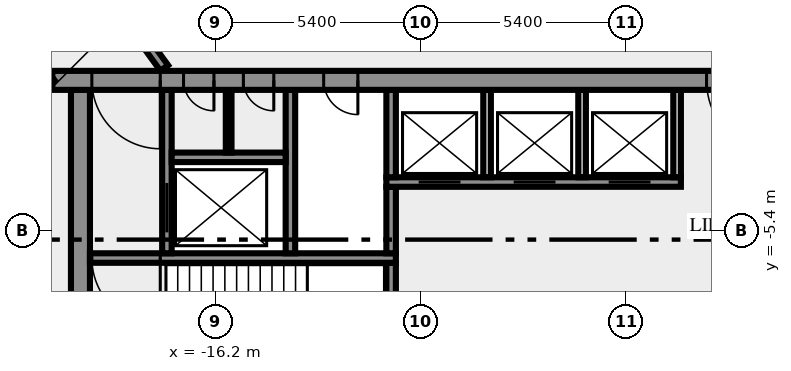
"""IFC4 building model, lengths in metres.
Left out: names, types, materials, properties, quantities, classifications, styles, units other than length and angle.
Written with IfcOpenShell. Run it as: python <this file> out.ifc"""

import sys

from ifc_helpers import new_model, si_unit, direction, frame, frame_2d, origin, place, context, subcontext, project, spatial, rectangle, extrude, element, fill, save


model = new_model("IFC4")
c1 = context("Model", 3, precision=1e-05, world=origin(), true_north=direction((0.0, 1.0)))
c2 = subcontext(c1, "Body", "Model", "MODEL_VIEW")
j1 = project(units=[si_unit("LENGTHUNIT", "METRE"), si_unit("PLANEANGLEUNIT", "RADIAN")], contexts=[c1])
p1 = place(None, origin())
s1 = spatial("IfcSite", under=j1, at=p1, CompositionType="ELEMENT")
p2 = place(p1, origin())
s2 = spatial("IfcBuilding", under=s1, at=p2, CompositionType="ELEMENT")
p3 = place(p2, frame((0.0, 0.0, 11.5)))
s3 = spatial("IfcBuildingStorey", under=s2, at=p3, CompositionType="ELEMENT", Elevation=11.5)
p4 = place(p3, frame((-19.75, -10.5, 0.0), z_axis=(0.0, 0.0, 1.0), x_axis=(0.0, 1.0, 0.0)))
e1 = element("IfcWall", 1, at=p4, inside=s3, PredefinedType="SHEAR", context=c2, shape_type="SweptSolid", body=[
    extrude(rectangle(XDim=8.8, YDim=0.5, at=frame_2d((4.4, 0.0))), origin(), (0.0, 0.0, 1.0), 4.1),
])
p5 = place(p3, frame((-11.575, -7.25, 0.0), z_axis=(0.0, 0.0, 1.0), x_axis=(0.0, 1.0, 0.0)))
e2 = element("IfcWall", 2, at=p5, inside=s3, PredefinedType="SHEAR", context=c2, shape_type="SweptSolid", body=[
    extrude(rectangle(XDim=1.0, YDim=0.25, at=frame_2d((0.5, 0.0))), origin(), (0.0, 0.0, 1.0), 4.1),
])
p6 = place(p3, frame((-11.45, -6.125, 0.0), z_axis=(0.0, 0.0, 1.0), x_axis=(-1.0, 0.0, 0.0)))
e3 = element("IfcWall", 3, at=p6, inside=s3, PredefinedType="SHEAR", context=c2, shape_type="SweptSolid", body=[
    extrude(rectangle(XDim=8.05, YDim=0.25, at=frame_2d((4.025, 0.0))), origin(), (0.0, 0.0, 1.0), 4.1),
])
p7 = place(p6, frame((6.2, 0.0, 0.0)))
e4 = element("IfcOpeningElement", 4, at=p7, cuts=e3, PredefinedType="OPENING", context=c2, shape_type="SweptSolid", body=[
    extrude(rectangle(XDim=1.8, YDim=2.1, at=frame_2d((0.9, 1.05))), frame((0.0, 0.135, 0.0), z_axis=(0.0, -1.0, 0.0), x_axis=(1.0, 0.0, 0.0)), (0.0, 0.0, 1.0), 0.27),
])
p8 = place(p3, frame((-17.475, -6.0, 0.0), z_axis=(0.0, 0.0, 1.0), x_axis=(0.0, 1.0, 0.0)))
e5 = element("IfcWall", 5, at=p8, inside=s3, PredefinedType="SHEAR", context=c2, shape_type="SweptSolid", body=[
    extrude(rectangle(XDim=4.3, YDim=0.25, at=frame_2d((2.15, 0.0))), origin(), (0.0, 0.0, 1.0), 4.1),
])
p9 = place(p8, frame((0.55, 0.0, 0.0)))
e6 = element("IfcOpeningElement", 6, at=p9, cuts=e5, PredefinedType="OPENING", context=c2, shape_type="SweptSolid", body=[
    extrude(rectangle(XDim=1.3, YDim=2.1, at=frame_2d((0.65, 1.05))), frame((0.0, 0.135, 0.0), z_axis=(0.0, -1.0, 0.0), x_axis=(1.0, 0.0, 0.0)), (0.0, 0.0, 1.0), 0.27),
])
p10 = place(p3, frame((-14.225, -6.0, 0.0), z_axis=(0.0, 0.0, 1.0), x_axis=(0.0, 1.0, 0.0)))
e7 = element("IfcWall", 7, at=p10, inside=s3, PredefinedType="SHEAR", context=c2, shape_type="SweptSolid", body=[
    extrude(rectangle(XDim=4.3, YDim=0.25, at=frame_2d((2.15, 0.0))), origin(), (0.0, 0.0, 1.0), 4.1),
])
p11 = place(p3, frame((-11.575, -6.0, 0.0), z_axis=(0.0, 0.0, 1.0), x_axis=(0.0, 1.0, 0.0)))
e8 = element("IfcWall", 8, at=p11, inside=s3, PredefinedType="SHEAR", context=c2, shape_type="SweptSolid", body=[
    extrude(rectangle(XDim=1.75, YDim=0.25, at=frame_2d((0.875, 0.0))), origin(), (0.0, 0.0, 1.0), 4.1),
])
p12 = place(p3, frame((-11.7, -4.125, 0.0), z_axis=(0.0, 0.0, 1.0), x_axis=(1.0, 0.0, 0.0)))
e9 = element("IfcWall", 9, at=p12, inside=s3, PredefinedType="SHEAR", context=c2, shape_type="SweptSolid", body=[
    extrude(rectangle(XDim=7.75, YDim=0.25, at=frame_2d((3.875, 0.0))), origin(), (0.0, 0.0, 1.0), 4.1),
])
p13 = place(p12, frame((0.85, 0.0, 0.0)))
e10 = element("IfcOpeningElement", 10, at=p13, cuts=e9, PredefinedType="OPENING", context=c2, shape_type="SweptSolid", body=[
    extrude(rectangle(XDim=1.1, YDim=2.1, at=frame_2d((0.55, 1.05))), frame((0.0, 0.135, 0.0), z_axis=(0.0, -1.0, 0.0), x_axis=(1.0, 0.0, 0.0)), (0.0, 0.0, 1.0), 0.27),
])
p14 = place(p12, frame((3.35, 0.0, 0.0)))
e11 = element("IfcOpeningElement", 11, at=p14, cuts=e9, PredefinedType="OPENING", context=c2, shape_type="SweptSolid", body=[
    extrude(rectangle(XDim=1.1, YDim=2.1, at=frame_2d((0.55, 1.05))), frame((0.0, 0.135, 0.0), z_axis=(0.0, -1.0, 0.0), x_axis=(1.0, 0.0, 0.0)), (0.0, 0.0, 1.0), 0.27),
])
p15 = place(p12, frame((5.85, 0.0, 0.0)))
e12 = element("IfcOpeningElement", 12, at=p15, cuts=e9, PredefinedType="OPENING", context=c2, shape_type="SweptSolid", body=[
    extrude(rectangle(XDim=1.1, YDim=2.1, at=frame_2d((0.55, 1.05))), frame((0.0, 0.135, 0.0), z_axis=(0.0, -1.0, 0.0), x_axis=(1.0, 0.0, 0.0)), (0.0, 0.0, 1.0), 0.27),
])
p16 = place(p3, frame((-11.575, -4.0, 0.0), z_axis=(0.0, 0.0, 1.0), x_axis=(0.0, 1.0, 0.0)))
e13 = element("IfcWall", 13, at=p16, inside=s3, PredefinedType="SHEAR", context=c2, shape_type="SweptSolid", body=[
    extrude(rectangle(XDim=2.3, YDim=0.25, at=frame_2d((1.15, 0.0))), origin(), (0.0, 0.0, 1.0), 4.1),
])
for number, where, z_axis, x_axis in (
    (14, (-9.05, -4.0, 0.0), (0.0, 0.0, 1.0), (0.0, 1.0, 0.0)),
    (15, (-6.55, -4.0, 0.0), (0.0, 0.0, 1.0), (0.0, 1.0, 0.0)),
    (16, (-4.05, -4.0, 0.0), (0.0, 0.0, 1.0), (0.0, 1.0, 0.0)),
):
    element("IfcWall", number, at=place(p3, frame(where, z_axis=z_axis, x_axis=x_axis)), inside=s3, PredefinedType="SOLIDWALL", context=c2, shape_type="SweptSolid", body=[
        extrude(rectangle(XDim=2.3, YDim=0.2, at=frame_2d((1.15, 0.0))), origin(), (0.0, 0.0, 1.0), 4.1),
    ])
p17 = place(p3, frame((-17.35, -3.475, 0.0), z_axis=(0.0, 0.0, 1.0), x_axis=(1.0, 0.0, 0.0)))
e17 = element("IfcWall", 17, at=p17, inside=s3, PredefinedType="SHEAR", context=c2, shape_type="SweptSolid", body=[
    extrude(rectangle(XDim=3.0, YDim=0.25, at=frame_2d((1.5, 0.0))), origin(), (0.0, 0.0, 1.0), 4.1),
])
p18 = place(p3, frame((-15.85, -3.35, 0.0), z_axis=(0.0, 0.0, 1.0), x_axis=(0.0, 1.0, 0.0)))
e18 = element("IfcWall", 18, at=p18, inside=s3, PredefinedType="PARTITIONING", context=c2, shape_type="SweptSolid", body=[
    extrude(rectangle(XDim=1.65, YDim=0.15, at=frame_2d((0.825, 0.0))), origin(), (0.0, 0.0, 1.0), 4.1),
])
p19 = place(p3, frame((20.49, -1.45, 0.0), z_axis=(0.0, 0.0, 1.0), x_axis=(-1.0, 0.0, 0.0)))
e19 = element("IfcWall", 19, at=p19, inside=s3, PredefinedType="SHEAR", context=c2, shape_type="SweptSolid", body=[
    extrude(rectangle(XDim=40.98, YDim=0.5, at=frame_2d((20.49, 0.0))), origin(), (0.0, 0.0, 1.0), 4.1),
])
p20 = place(p19, frame((38.14, 0.0, 0.0)))
e20 = element("IfcOpeningElement", 20, at=p20, cuts=e19, PredefinedType="OPENING", context=c2, shape_type="SweptSolid", body=[
    extrude(rectangle(XDim=1.8, YDim=2.1, at=frame_2d((0.9, 1.05))), frame((0.0, 0.26, 0.0), z_axis=(0.0, -1.0, 0.0), x_axis=(1.0, 0.0, 0.0)), (0.0, 0.0, 1.0), 0.52),
])
p21 = place(p19, frame((36.728, 0.0, 0.0)))
e21 = element("IfcOpeningElement", 21, at=p21, cuts=e19, PredefinedType="OPENING", context=c2, shape_type="SweptSolid", body=[
    extrude(rectangle(XDim=0.8, YDim=2.1, at=frame_2d((0.4, 1.05))), frame((0.0, 0.26, 0.0), z_axis=(0.0, -1.0, 0.0), x_axis=(1.0, 0.0, 0.0)), (0.0, 0.0, 1.0), 0.52),
])
p22 = place(p19, frame((35.153, 0.0, 0.0)))
e22 = element("IfcOpeningElement", 22, at=p22, cuts=e19, PredefinedType="OPENING", context=c2, shape_type="SweptSolid", body=[
    extrude(rectangle(XDim=0.8, YDim=2.1, at=frame_2d((0.4, 1.05))), frame((0.0, 0.26, 0.0), z_axis=(0.0, -1.0, 0.0), x_axis=(1.0, 0.0, 0.0)), (0.0, 0.0, 1.0), 0.52),
])
p23 = place(p19, frame((32.94, 0.0, 0.0)))
e23 = element("IfcOpeningElement", 23, at=p23, cuts=e19, PredefinedType="OPENING", context=c2, shape_type="SweptSolid", body=[
    extrude(rectangle(XDim=0.9, YDim=2.1, at=frame_2d((0.45, 1.05))), frame((0.0, 0.26, 0.0), z_axis=(0.0, -1.0, 0.0), x_axis=(1.0, 0.0, 0.0)), (0.0, 0.0, 1.0), 0.52),
])
p24 = place(p19, frame((21.765, 0.0, 0.0)))
e24 = element("IfcOpeningElement", 24, at=p24, cuts=e19, PredefinedType="OPENING", context=c2, shape_type="SweptSolid", body=[
    extrude(rectangle(XDim=2.0, YDim=2.1, at=frame_2d((1.0, 1.05))), frame((0.0, 0.26, 0.0), z_axis=(0.0, -1.0, 0.0), x_axis=(1.0, 0.0, 0.0)), (0.0, 0.0, 1.0), 0.52),
])
p25 = place(p19, frame((7.14, 0.0, 0.0)))
e25 = element("IfcOpeningElement", 25, at=p25, cuts=e19, PredefinedType="OPENING", context=c2, shape_type="SweptSolid", body=[
    extrude(rectangle(XDim=0.9, YDim=2.1, at=frame_2d((0.45, 1.05))), frame((0.0, 0.26, 0.0), z_axis=(0.0, -1.0, 0.0), x_axis=(1.0, 0.0, 0.0)), (0.0, 0.0, 1.0), 0.52),
])
p26 = place(p19, frame((4.19, 0.0, 0.0)))
e26 = element("IfcOpeningElement", 26, at=p26, cuts=e19, PredefinedType="OPENING", context=c2, shape_type="SweptSolid", body=[
    extrude(rectangle(XDim=0.9, YDim=2.1, at=frame_2d((0.45, 1.05))), frame((0.0, 0.26, 0.0), z_axis=(0.0, -1.0, 0.0), x_axis=(1.0, 0.0, 0.0)), (0.0, 0.0, 1.0), 0.52),
])
p27 = place(p19, frame((1.04, 0.0, 0.0)))
e27 = element("IfcOpeningElement", 27, at=p27, cuts=e19, PredefinedType="OPENING", context=c2, shape_type="SweptSolid", body=[
    extrude(rectangle(XDim=1.8, YDim=2.1, at=frame_2d((0.9, 1.05))), frame((0.0, 0.26, 0.0), z_axis=(0.0, -1.0, 0.0), x_axis=(1.0, 0.0, 0.0)), (0.0, 0.0, 1.0), 0.52),
])
p28 = place(p3, frame((-20.531, -1.523, 0.0), z_axis=(0.0, 0.0, 1.0), x_axis=(-0.587784522481, 0.809017524614, 0.0)))
e28 = element("IfcWall", 28, at=p28, inside=s3, PredefinedType="SOLIDWALL", context=c2, shape_type="SweptSolid", body=[
    extrude(rectangle(XDim=49.912, YDim=0.25, at=frame_2d((24.956, 0.0))), origin(), (0.0, 0.0, 1.0), 4.1),
])
p29 = place(p28, frame((48.57, 0.0, 0.0)))
e29 = element("IfcOpeningElement", 29, at=p29, cuts=e28, PredefinedType="OPENING", context=c2, shape_type="SweptSolid", body=[
    extrude(rectangle(XDim=0.9, YDim=2.1, at=frame_2d((0.45, 1.05))), frame((0.0, 0.135, 0.0), z_axis=(0.0, -1.0, 0.0), x_axis=(1.0, 0.0, 0.0)), (0.0, 0.0, 1.0), 0.27),
])
p30 = place(p28, frame((9.165, 0.0, 0.0)))
e30 = element("IfcOpeningElement", 30, at=p30, cuts=e28, PredefinedType="OPENING", context=c2, shape_type="SweptSolid", body=[
    extrude(rectangle(XDim=0.9, YDim=2.1, at=frame_2d((0.45, 1.05))), frame((0.0, 0.135, 0.0), z_axis=(0.0, -1.0, 0.0), x_axis=(1.0, 0.0, 0.0)), (0.0, 0.0, 1.0), 0.27),
])
p31 = place(p28, frame((21.416, 0.0, 0.0)))
e31 = element("IfcOpeningElement", 31, at=p31, cuts=e28, PredefinedType="OPENING", context=c2, shape_type="SweptSolid", body=[
    extrude(rectangle(XDim=1.8, YDim=2.1, at=frame_2d((0.9, 1.05))), frame((0.0, 0.135, 0.0), z_axis=(0.0, -1.0, 0.0), x_axis=(1.0, 0.0, 0.0)), (0.0, 0.0, 1.0), 0.27),
])
p32 = place(p28, frame((28.066, 0.0, 0.0)))
e32 = element("IfcOpeningElement", 32, at=p32, cuts=e28, PredefinedType="OPENING", context=c2, shape_type="SweptSolid", body=[
    extrude(rectangle(XDim=0.9, YDim=2.1, at=frame_2d((0.45, 1.05))), frame((0.0, 0.135, 0.0), z_axis=(0.0, -1.0, 0.0), x_axis=(1.0, 0.0, 0.0)), (0.0, 0.0, 1.0), 0.27),
])
p33 = place(p28, frame((0.533, 0.0, 0.0)))
e33 = element("IfcOpeningElement", 33, at=p33, cuts=e28, PredefinedType="OPENING", context=c2, shape_type="SweptSolid", body=[
    extrude(rectangle(XDim=0.9, YDim=2.1, at=frame_2d((0.45, 1.05))), frame((0.0, 0.135, 0.0), z_axis=(0.0, -1.0, 0.0), x_axis=(1.0, 0.0, 0.0)), (0.0, 0.0, 1.0), 0.27),
])
p34 = place(p3, frame((-37.232, 25.972, 0.0), z_axis=(0.0, 0.0, 1.0), x_axis=(0.587786323093, -0.809016216391, 0.0)))
e34 = element("IfcWall", 34, at=p34, inside=s3, PredefinedType="SOLIDWALL", context=c2, shape_type="SweptSolid", body=[
    extrude(rectangle(XDim=33.493, YDim=0.25, at=frame_2d((16.747, 0.0))), origin(), (0.0, 0.0, 1.0), 4.1),
])
p35 = place(p34, frame((4.438, 0.0, 0.0)))
e35 = element("IfcOpeningElement", 35, at=p35, cuts=e34, PredefinedType="OPENING", context=c2, shape_type="SweptSolid", body=[
    extrude(rectangle(XDim=1.8, YDim=2.1, at=frame_2d((0.9, 1.05))), frame((0.0, 0.135, 0.0), z_axis=(0.0, -1.0, 0.0), x_axis=(1.0, 0.0, 0.0)), (0.0, 0.0, 1.0), 0.27),
])
p36 = place(p34, frame((29.152, 0.0, 0.0)))
e36 = element("IfcOpeningElement", 36, at=p36, cuts=e34, PredefinedType="OPENING", context=c2, shape_type="SweptSolid", body=[
    extrude(rectangle(XDim=0.9, YDim=2.1, at=frame_2d((0.45, 1.05))), frame((0.0, 0.135, 0.0), z_axis=(0.0, -1.0, 0.0), x_axis=(1.0, 0.0, 0.0)), (0.0, 0.0, 1.0), 0.27),
])
p37 = place(p34, frame((14.835, 0.0, 0.0)))
e37 = element("IfcOpeningElement", 37, at=p37, cuts=e34, PredefinedType="OPENING", context=c2, shape_type="SweptSolid", body=[
    extrude(rectangle(XDim=0.9, YDim=2.1, at=frame_2d((0.45, 1.05))), frame((0.0, 0.135, 0.0), z_axis=(0.0, -1.0, 0.0), x_axis=(1.0, 0.0, 0.0)), (0.0, 0.0, 1.0), 0.27),
])
p38 = place(p7, origin())
e38 = element("IfcDoor", 38, at=p38, inside=s3, OperationType="DOUBLE_DOOR_SINGLE_SWING", PredefinedType="DOOR", context=c2, shape_type="SweptSolid", body=[
    extrude(rectangle(XDim=1.8, YDim=2.1, at=frame_2d((0.9, 1.05))), frame((0.0, 0.025, 0.0), z_axis=(0.0, -1.0, 0.0), x_axis=(1.0, 0.0, 0.0)), (0.0, 0.0, 1.0), 0.05),
])
fill(e4, e38)
p39 = place(p9, origin())
e39 = element("IfcDoor", 39, at=p39, inside=s3, OperationType="DOUBLE_DOOR_SLIDING", PredefinedType="DOOR", context=c2, shape_type="SweptSolid", body=[
    extrude(rectangle(XDim=1.3, YDim=2.1, at=frame_2d((0.65, 1.05))), frame((0.0, 0.025, 0.0), z_axis=(0.0, -1.0, 0.0), x_axis=(1.0, 0.0, 0.0)), (0.0, 0.0, 1.0), 0.05),
])
fill(e6, e39)
p40 = place(p13, origin())
e40 = element("IfcDoor", 40, at=p40, inside=s3, OperationType="DOUBLE_DOOR_SLIDING", PredefinedType="DOOR", context=c2, shape_type="SweptSolid", body=[
    extrude(rectangle(XDim=1.1, YDim=2.1, at=frame_2d((0.55, 1.05))), frame((0.0, 0.025, 0.0), z_axis=(0.0, -1.0, 0.0), x_axis=(1.0, 0.0, 0.0)), (0.0, 0.0, 1.0), 0.05),
])
fill(e10, e40)
p41 = place(p14, origin())
e41 = element("IfcDoor", 41, at=p41, inside=s3, OperationType="DOUBLE_DOOR_SLIDING", PredefinedType="DOOR", context=c2, shape_type="SweptSolid", body=[
    extrude(rectangle(XDim=1.1, YDim=2.1, at=frame_2d((0.55, 1.05))), frame((0.0, 0.025, 0.0), z_axis=(0.0, -1.0, 0.0), x_axis=(1.0, 0.0, 0.0)), (0.0, 0.0, 1.0), 0.05),
])
fill(e11, e41)
p42 = place(p15, origin())
e42 = element("IfcDoor", 42, at=p42, inside=s3, OperationType="DOUBLE_DOOR_SLIDING", PredefinedType="DOOR", context=c2, shape_type="SweptSolid", body=[
    extrude(rectangle(XDim=1.1, YDim=2.1, at=frame_2d((0.55, 1.05))), frame((0.0, 0.025, 0.0), z_axis=(0.0, -1.0, 0.0), x_axis=(1.0, 0.0, 0.0)), (0.0, 0.0, 1.0), 0.05),
])
fill(e12, e42)
p43 = place(p20, origin())
e43 = element("IfcDoor", 43, at=p43, inside=s3, OperationType="DOUBLE_DOOR_SINGLE_SWING", PredefinedType="DOOR", context=c2, shape_type="SweptSolid", body=[
    extrude(rectangle(XDim=1.8, YDim=2.1, at=frame_2d((0.9, 1.05))), frame((0.0, 0.025, 0.0), z_axis=(0.0, -1.0, 0.0), x_axis=(1.0, 0.0, 0.0)), (0.0, 0.0, 1.0), 0.05),
])
fill(e20, e43)
p44 = place(p21, origin())
e44 = element("IfcDoor", 44, at=p44, inside=s3, OperationType="SINGLE_SWING_RIGHT", PredefinedType="DOOR", context=c2, shape_type="SweptSolid", body=[
    extrude(rectangle(XDim=0.8, YDim=2.1, at=frame_2d((0.4, 1.05))), frame((0.0, 0.025, 0.0), z_axis=(0.0, -1.0, 0.0), x_axis=(1.0, 0.0, 0.0)), (0.0, 0.0, 1.0), 0.05),
])
fill(e21, e44)
p45 = place(p22, origin())
e45 = element("IfcDoor", 45, at=p45, inside=s3, OperationType="SINGLE_SWING_RIGHT", PredefinedType="DOOR", context=c2, shape_type="SweptSolid", body=[
    extrude(rectangle(XDim=0.8, YDim=2.1, at=frame_2d((0.4, 1.05))), frame((0.0, 0.025, 0.0), z_axis=(0.0, -1.0, 0.0), x_axis=(1.0, 0.0, 0.0)), (0.0, 0.0, 1.0), 0.05),
])
fill(e22, e45)
p46 = place(p23, origin())
e46 = element("IfcDoor", 46, at=p46, inside=s3, OperationType="SINGLE_SWING_RIGHT", PredefinedType="DOOR", context=c2, shape_type="SweptSolid", body=[
    extrude(rectangle(XDim=0.9, YDim=2.1, at=frame_2d((0.45, 1.05))), frame((0.0, 0.025, 0.0), z_axis=(0.0, -1.0, 0.0), x_axis=(1.0, 0.0, 0.0)), (0.0, 0.0, 1.0), 0.05),
])
fill(e23, e46)
p47 = place(p24, origin())
e47 = element("IfcDoor", 47, at=p47, inside=s3, OperationType="DOUBLE_DOOR_SINGLE_SWING", PredefinedType="DOOR", context=c2, shape_type="SweptSolid", body=[
    extrude(rectangle(XDim=2.0, YDim=2.1, at=frame_2d((1.0, 1.05))), frame((0.0, 0.025, 0.0), z_axis=(0.0, -1.0, 0.0), x_axis=(1.0, 0.0, 0.0)), (0.0, 0.0, 1.0), 0.05),
])
fill(e24, e47)
save(model, sys.argv[1])
